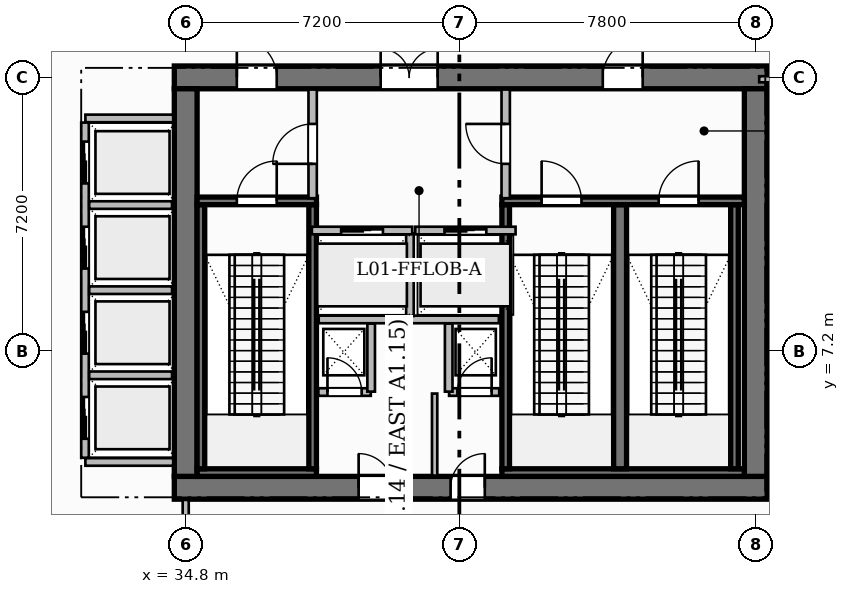
"""IFC4 building model, lengths in metres.
Left out: names, types, materials, properties, quantities, classifications, styles, units other than length and angle.
Written with IfcOpenShell. Run it as: python <this file> out.ifc"""

import sys

from ifc_helpers import new_model, si_unit, direction, frame, frame_2d, origin, place, context, subcontext, project, spatial, rectangle, extrude, source, transform, mapped, element, fill, save


model = new_model("IFC4")
c1 = context("Model", 3, precision=1e-05, world=origin(), true_north=direction((0.0, 1.0)))
c2 = subcontext(c1, "Body", "Model", "MODEL_VIEW")
j1 = project(units=[si_unit("LENGTHUNIT", "METRE"), si_unit("PLANEANGLEUNIT", "RADIAN")], contexts=[c1])
p1 = place(None, origin())
s1 = spatial("IfcSite", under=j1, at=p1, CompositionType="ELEMENT")
p2 = place(p1, origin())
s2 = spatial("IfcBuilding", under=s1, at=p2, CompositionType="ELEMENT")
p3 = place(p2, frame((0.0, 0.0, 5.4)))
s3 = spatial("IfcBuildingStorey", under=s2, at=p3, CompositionType="ELEMENT", Elevation=5.4)
p4 = place(p3, frame((34.5, 3.6, 0.0), z_axis=(0.0, 0.0, 1.0), x_axis=(1.0, 0.0, 0.0)))
e1 = element("IfcWall", 1, at=p4, inside=s3, PredefinedType="SHEAR", context=c2, shape_type="SweptSolid", body=[
    extrude(rectangle(XDim=15.6, YDim=0.6, at=frame_2d((7.8, 0.0))), origin(), (0.0, 0.0, 1.0), 5.4),
])
p5 = place(p4, frame((4.85, 0.0, 0.0)))
e2 = element("IfcOpeningElement", 2, at=p5, cuts=e1, PredefinedType="OPENING", context=c2, shape_type="SweptSolid", body=[
    extrude(rectangle(XDim=0.9, YDim=2.1, at=frame_2d((0.45, 1.05))), frame((0.0, 0.31, 0.0), z_axis=(0.0, -1.0, 0.0), x_axis=(1.0, 0.0, 0.0)), (0.0, 0.0, 1.0), 0.62),
])
p6 = place(p4, frame((7.27, 0.0, 0.0)))
e3 = element("IfcOpeningElement", 3, at=p6, cuts=e1, PredefinedType="OPENING", context=c2, shape_type="SweptSolid", body=[
    extrude(rectangle(XDim=0.9, YDim=2.1, at=frame_2d((0.45, 1.05))), frame((0.0, 0.31, 0.0), z_axis=(0.0, -1.0, 0.0), x_axis=(1.0, 0.0, 0.0)), (0.0, 0.0, 1.0), 0.62),
])
p7 = place(p3, frame((34.5, 14.4, 0.0), z_axis=(0.0, 0.0, 1.0), x_axis=(1.0, 0.0, 0.0)))
e4 = element("IfcWall", 4, at=p7, inside=s3, PredefinedType="SHEAR", context=c2, shape_type="SweptSolid", body=[
    extrude(rectangle(XDim=15.6, YDim=0.6, at=frame_2d((7.8, 0.0))), origin(), (0.0, 0.0, 1.0), 5.4),
])
p8 = place(p7, frame((5.43, 0.0, 0.0)))
e5 = element("IfcOpeningElement", 5, at=p8, cuts=e4, PredefinedType="OPENING", context=c2, shape_type="SweptSolid", body=[
    extrude(rectangle(XDim=1.5, YDim=2.2, at=frame_2d((0.75, 1.1))), frame((0.0, 0.31, 0.0), z_axis=(0.0, -1.0, 0.0), x_axis=(1.0, 0.0, 0.0)), (0.0, 0.0, 1.0), 0.62),
])
p9 = place(p7, frame((1.645, 0.0, 0.0)))
e6 = element("IfcOpeningElement", 6, at=p9, cuts=e4, PredefinedType="OPENING", context=c2, shape_type="SweptSolid", body=[
    extrude(rectangle(XDim=1.05, YDim=2.15, at=frame_2d((0.525, 1.075))), frame((0.0, 0.31, 0.0), z_axis=(0.0, -1.0, 0.0), x_axis=(1.0, 0.0, 0.0)), (0.0, 0.0, 1.0), 0.62),
])
p10 = place(p7, frame((11.275, 0.0, 0.0)))
e7 = element("IfcOpeningElement", 7, at=p10, cuts=e4, PredefinedType="OPENING", context=c2, shape_type="SweptSolid", body=[
    extrude(rectangle(XDim=1.05, YDim=2.15, at=frame_2d((0.525, 1.075))), frame((0.0, 0.31, 0.0), z_axis=(0.0, -1.0, 0.0), x_axis=(1.0, 0.0, 0.0)), (0.0, 0.0, 1.0), 0.62),
])
for number, where, z_axis, x_axis in (
    (8, (34.8, 3.9, 0.0), (0.0, 0.0, 1.0), (0.0, 1.0, 0.0)),
    (9, (49.8, 3.9, 0.0), (0.0, 0.0, 1.0), (0.0, 1.0, 0.0)),
):
    element("IfcWall", number, at=place(p3, frame(where, z_axis=z_axis, x_axis=x_axis)), inside=s3, PredefinedType="SHEAR", context=c2, shape_type="SweptSolid", body=[
        extrude(rectangle(XDim=10.2, YDim=0.6, at=frame_2d((5.1, 0.0))), origin(), (0.0, 0.0, 1.0), 5.4),
    ])
p11 = place(p3, frame((35.1, 4.0, 0.0), z_axis=(0.0, 0.0, 1.0), x_axis=(1.0, 0.0, 0.0)))
e10 = element("IfcWall", 10, at=p11, inside=s3, PredefinedType="SHEAR", context=c2, shape_type="SweptSolid", body=[
    extrude(rectangle(XDim=3.14, YDim=0.2, at=frame_2d((1.57, 0.0))), origin(), (0.0, 0.0, 1.0), 5.4),
])
for number, where, z_axis, x_axis in (
    (11, (35.2, 4.1, 0.0), (0.0, 0.0, 1.0), (0.0, 1.0, 0.0)),
    (12, (38.14, 4.1, 0.0), (0.0, 0.0, 1.0), (0.0, 1.0, 0.0)),
):
    element("IfcWall", number, at=place(p3, frame(where, z_axis=z_axis, x_axis=x_axis)), inside=s3, PredefinedType="SHEAR", context=c2, shape_type="SweptSolid", body=[
        extrude(rectangle(XDim=6.95, YDim=0.2, at=frame_2d((3.475, 0.0))), origin(), (0.0, 0.0, 1.0), 5.4),
    ])
p12 = place(p3, frame((35.1, 11.15, 0.0), z_axis=(0.0, 0.0, 1.0), x_axis=(1.0, 0.0, 0.0)))
e13 = element("IfcWall", 13, at=p12, inside=s3, PredefinedType="SHEAR", context=c2, shape_type="SweptSolid", body=[
    extrude(rectangle(XDim=3.14, YDim=0.2, at=frame_2d((1.57, 0.0))), origin(), (0.0, 0.0, 1.0), 5.4),
])
p13 = place(p12, frame((1.045, 0.0, 0.0)))
e14 = element("IfcOpeningElement", 14, at=p13, cuts=e13, PredefinedType="OPENING", context=c2, shape_type="SweptSolid", body=[
    extrude(rectangle(XDim=1.05, YDim=2.2, at=frame_2d((0.525, 1.1))), frame((0.0, 0.11, 0.0), z_axis=(0.0, -1.0, 0.0), x_axis=(1.0, 0.0, 0.0)), (0.0, 0.0, 1.0), 0.22),
])
p14 = place(p3, frame((43.12, 4.0, 0.0), z_axis=(0.0, 0.0, 1.0), x_axis=(1.0, 0.0, 0.0)))
e15 = element("IfcWall", 15, at=p14, inside=s3, PredefinedType="SHEAR", context=c2, shape_type="SweptSolid", body=[
    extrude(rectangle(XDim=6.38, YDim=0.2, at=frame_2d((3.19, 0.0))), origin(), (0.0, 0.0, 1.0), 5.4),
])
p15 = place(p3, frame((43.22, 4.1, 0.0), z_axis=(0.0, 0.0, 1.0), x_axis=(0.0, 1.0, 0.0)))
e16 = element("IfcWall", 16, at=p15, inside=s3, PredefinedType="SHEAR", context=c2, shape_type="SweptSolid", body=[
    extrude(rectangle(XDim=6.95, YDim=0.2, at=frame_2d((3.475, 0.0))), origin(), (0.0, 0.0, 1.0), 5.4),
])
p16 = place(p3, frame((46.23, 4.1, 0.0), z_axis=(0.0, 0.0, 1.0), x_axis=(0.0, 1.0, 0.0)))
e17 = element("IfcWall", 17, at=p16, inside=s3, PredefinedType="SHEAR", context=c2, shape_type="SweptSolid", body=[
    extrude(rectangle(XDim=6.95, YDim=0.34, at=frame_2d((3.475, 0.0))), origin(), (0.0, 0.0, 1.0), 5.4),
])
p17 = place(p3, frame((49.24, 4.1, 0.0), z_axis=(0.0, 0.0, 1.0), x_axis=(0.0, 1.0, 0.0)))
e18 = element("IfcWall", 18, at=p17, inside=s3, PredefinedType="SHEAR", context=c2, shape_type="SweptSolid", body=[
    extrude(rectangle(XDim=6.95, YDim=0.2, at=frame_2d((3.475, 0.0))), origin(), (0.0, 0.0, 1.0), 5.4),
])
p18 = place(p3, frame((43.12, 11.15, 0.0), z_axis=(0.0, 0.0, 1.0), x_axis=(1.0, 0.0, 0.0)))
e19 = element("IfcWall", 19, at=p18, inside=s3, PredefinedType="SHEAR", context=c2, shape_type="SweptSolid", body=[
    extrude(rectangle(XDim=6.38, YDim=0.2, at=frame_2d((3.19, 0.0))), origin(), (0.0, 0.0, 1.0), 5.4),
])
p19 = place(p18, frame((1.045, 0.0, 0.0)))
e20 = element("IfcOpeningElement", 20, at=p19, cuts=e19, PredefinedType="OPENING", context=c2, shape_type="SweptSolid", body=[
    extrude(rectangle(XDim=1.05, YDim=2.2, at=frame_2d((0.525, 1.1))), frame((0.0, 0.11, 0.0), z_axis=(0.0, -1.0, 0.0), x_axis=(1.0, 0.0, 0.0)), (0.0, 0.0, 1.0), 0.22),
])
p20 = place(p18, frame((4.125, 0.0, 0.0)))
e21 = element("IfcOpeningElement", 21, at=p20, cuts=e19, PredefinedType="OPENING", context=c2, shape_type="SweptSolid", body=[
    extrude(rectangle(XDim=1.05, YDim=2.2, at=frame_2d((0.525, 1.1))), frame((0.0, 0.11, 0.0), z_axis=(0.0, -1.0, 0.0), x_axis=(1.0, 0.0, 0.0)), (0.0, 0.0, 1.0), 0.22),
])
p21 = place(p3, frame((38.3, 8.03, 0.0), z_axis=(0.0, 0.0, 1.0), x_axis=(1.0, 0.0, 0.0)))
e22 = element("IfcWall", 22, at=p21, inside=s3, PredefinedType="PARTITIONING", context=c2, shape_type="SweptSolid", body=[
    extrude(rectangle(XDim=4.74, YDim=0.2, at=frame_2d((2.37, 0.0))), origin(), (0.0, 0.0, 1.0), 5.1),
])
p22 = place(p3, frame((40.7, 8.12, 0.0), z_axis=(0.0, 0.0, 1.0), x_axis=(0.0, 1.0, 0.0)))
e23 = element("IfcWall", 23, at=p22, inside=s3, PredefinedType="PARTITIONING", context=c2, shape_type="SweptSolid", body=[
    extrude(rectangle(XDim=2.18, YDim=0.2, at=frame_2d((1.09, 0.0))), origin(), (0.0, 0.0, 1.0), 5.1),
])
p23 = place(p3, frame((38.14, 11.22, 0.0), z_axis=(0.0, 0.0, 1.0), x_axis=(0.0, 1.0, 0.0)))
e24 = element("IfcWall", 24, at=p23, inside=s3, PredefinedType="PARTITIONING", context=c2, shape_type="SweptSolid", body=[
    extrude(rectangle(XDim=2.86, YDim=0.22, at=frame_2d((1.43, 0.0))), origin(), (0.0, 0.0, 1.0), 5.1),
])
p24 = place(p23, frame((0.905, 0.0, 0.0)))
e25 = element("IfcOpeningElement", 25, at=p24, cuts=e24, PredefinedType="OPENING", context=c2, shape_type="SweptSolid", body=[
    extrude(rectangle(XDim=1.05, YDim=2.15, at=frame_2d((0.525, 1.075))), frame((0.0, 0.12, 0.0), z_axis=(0.0, -1.0, 0.0), x_axis=(1.0, 0.0, 0.0)), (0.0, 0.0, 1.0), 0.24),
])
p25 = place(p3, frame((43.22, 11.22, 0.0), z_axis=(0.0, 0.0, 1.0), x_axis=(0.0, 1.0, 0.0)))
e26 = element("IfcWall", 26, at=p25, inside=s3, PredefinedType="PARTITIONING", context=c2, shape_type="SweptSolid", body=[
    extrude(rectangle(XDim=2.86, YDim=0.22, at=frame_2d((1.43, 0.0))), origin(), (0.0, 0.0, 1.0), 5.1),
])
p26 = place(p25, frame((0.905, 0.0, 0.0)))
e27 = element("IfcOpeningElement", 27, at=p26, cuts=e26, PredefinedType="OPENING", context=c2, shape_type="SweptSolid", body=[
    extrude(rectangle(XDim=1.05, YDim=2.15, at=frame_2d((0.525, 1.075))), frame((0.0, 0.12, 0.0), z_axis=(0.0, -1.0, 0.0), x_axis=(1.0, 0.0, 0.0)), (0.0, 0.0, 1.0), 0.24),
])
p27 = place(p3, frame((38.29, 6.12, 0.0), z_axis=(0.0, 0.0, 1.0), x_axis=(1.0, 0.0, 0.0)))
e28 = element("IfcWall", 28, at=p27, inside=s3, PredefinedType="PARTITIONING", context=c2, shape_type="SweptSolid", body=[
    extrude(rectangle(XDim=1.38, YDim=0.2, at=frame_2d((0.69, 0.0))), origin(), (0.0, 0.0, 1.0), 5.1),
])
p28 = place(p27, frame((0.24, 0.0, 0.0)))
e29 = element("IfcOpeningElement", 29, at=p28, cuts=e28, PredefinedType="OPENING", context=c2, shape_type="SweptSolid", body=[
    extrude(rectangle(XDim=0.9, YDim=2.1, at=frame_2d((0.45, 1.05))), frame((0.0, 0.11, 0.0), z_axis=(0.0, -1.0, 0.0), x_axis=(1.0, 0.0, 0.0)), (0.0, 0.0, 1.0), 0.22),
])
p29 = place(p3, frame((39.68, 6.13, 0.0), z_axis=(0.0, 0.0, 1.0), x_axis=(0.0, 1.0, 0.0)))
e30 = element("IfcWall", 30, at=p29, inside=s3, PredefinedType="PARTITIONING", context=c2, shape_type="SweptSolid", body=[
    extrude(rectangle(XDim=1.79, YDim=0.2, at=frame_2d((0.895, 0.0))), origin(), (0.0, 0.0, 1.0), 5.1),
])
p30 = place(p3, frame((41.73, 6.12, 0.0), z_axis=(0.0, 0.0, 1.0), x_axis=(1.0, 0.0, 0.0)))
e31 = element("IfcWall", 31, at=p30, inside=s3, PredefinedType="PARTITIONING", context=c2, shape_type="SweptSolid", body=[
    extrude(rectangle(XDim=1.32, YDim=0.2, at=frame_2d((0.66, 0.0))), origin(), (0.0, 0.0, 1.0), 5.1),
])
p31 = place(p30, frame((0.22, 0.0, 0.0)))
e32 = element("IfcOpeningElement", 32, at=p31, cuts=e31, PredefinedType="OPENING", context=c2, shape_type="SweptSolid", body=[
    extrude(rectangle(XDim=0.9, YDim=2.1, at=frame_2d((0.45, 1.05))), frame((0.0, 0.11, 0.0), z_axis=(0.0, -1.0, 0.0), x_axis=(1.0, 0.0, 0.0)), (0.0, 0.0, 1.0), 0.22),
])
p32 = place(p3, frame((41.72, 6.13, 0.0), z_axis=(0.0, 0.0, 1.0), x_axis=(0.0, 1.0, 0.0)))
e33 = element("IfcWall", 33, at=p32, inside=s3, PredefinedType="PARTITIONING", context=c2, shape_type="SweptSolid", body=[
    extrude(rectangle(XDim=1.79, YDim=0.2, at=frame_2d((0.895, 0.0))), origin(), (0.0, 0.0, 1.0), 5.1),
])
p33 = place(p3, frame((41.35, 3.92, 0.0), z_axis=(0.0, 0.0, 1.0), x_axis=(0.0, 1.0, 0.0)))
e34 = element("IfcWall", 34, at=p33, inside=s3, PredefinedType="PARTITIONING", context=c2, shape_type="SweptSolid", body=[
    extrude(rectangle(XDim=2.16, YDim=0.14, at=frame_2d((1.08, 0.0))), origin(), (0.0, 0.0, 1.0), 5.1),
])
for number, where, z_axis, x_axis in (
    (35, (32.16, 4.28, 0.0), (0.0, 0.0, 1.0), (1.0, 0.0, 0.0)),
    (36, (32.16, 13.32, 0.0), (0.0, 0.0, 1.0), (1.0, 0.0, 0.0)),
):
    element("IfcWall", number, at=place(p3, frame(where, z_axis=z_axis, x_axis=x_axis)), inside=s3, PredefinedType="PARTITIONING", context=c2, shape_type="SweptSolid", body=[
        extrude(rectangle(XDim=2.31, YDim=0.2, at=frame_2d((1.155, 0.0))), origin(), (0.0, 0.0, 1.0), 5.1),
    ])
p34 = place(p3, frame((32.15, 4.39, 0.0), z_axis=(0.0, 0.0, 1.0), x_axis=(0.0, 1.0, 0.0)))
e37 = element("IfcWall", 37, at=p34, inside=s3, PredefinedType="PARTITIONING", context=c2, shape_type="SweptSolid", body=[
    extrude(rectangle(XDim=8.82, YDim=0.2, at=frame_2d((4.41, 0.0))), origin(), (0.0, 0.0, 1.0), 5.1),
])
p35 = place(p34, frame((0.5, 0.0, 0.0)))
e38 = element("IfcOpeningElement", 38, at=p35, cuts=e37, PredefinedType="OPENING", context=c2, shape_type="SweptSolid", body=[
    extrude(rectangle(XDim=1.1, YDim=2.2, at=frame_2d((0.55, 1.1))), frame((0.0, 0.11, 0.0), z_axis=(0.0, -1.0, 0.0), x_axis=(1.0, 0.0, 0.0)), (0.0, 0.0, 1.0), 0.22),
])
p36 = place(p34, frame((2.74, 0.0, 0.0)))
e39 = element("IfcOpeningElement", 39, at=p36, cuts=e37, PredefinedType="OPENING", context=c2, shape_type="SweptSolid", body=[
    extrude(rectangle(XDim=1.1, YDim=2.2, at=frame_2d((0.55, 1.1))), frame((0.0, 0.11, 0.0), z_axis=(0.0, -1.0, 0.0), x_axis=(1.0, 0.0, 0.0)), (0.0, 0.0, 1.0), 0.22),
])
p37 = place(p34, frame((4.98, 0.0, 0.0)))
e40 = element("IfcOpeningElement", 40, at=p37, cuts=e37, PredefinedType="OPENING", context=c2, shape_type="SweptSolid", body=[
    extrude(rectangle(XDim=1.1, YDim=2.2, at=frame_2d((0.55, 1.1))), frame((0.0, 0.11, 0.0), z_axis=(0.0, -1.0, 0.0), x_axis=(1.0, 0.0, 0.0)), (0.0, 0.0, 1.0), 0.22),
])
p38 = place(p34, frame((7.22, 0.0, 0.0)))
e41 = element("IfcOpeningElement", 41, at=p38, cuts=e37, PredefinedType="OPENING", context=c2, shape_type="SweptSolid", body=[
    extrude(rectangle(XDim=1.1, YDim=2.2, at=frame_2d((0.55, 1.1))), frame((0.0, 0.11, 0.0), z_axis=(0.0, -1.0, 0.0), x_axis=(1.0, 0.0, 0.0)), (0.0, 0.0, 1.0), 0.22),
])
for number, where, z_axis, x_axis in (
    (42, (32.26, 6.56, 0.0), (0.0, 0.0, 1.0), (1.0, 0.0, 0.0)),
    (43, (32.26, 8.8, 0.0), (0.0, 0.0, 1.0), (1.0, 0.0, 0.0)),
    (44, (32.26, 11.04, 0.0), (0.0, 0.0, 1.0), (1.0, 0.0, 0.0)),
):
    element("IfcWall", number, at=place(p3, frame(where, z_axis=z_axis, x_axis=x_axis)), inside=s3, PredefinedType="PARTITIONING", context=c2, shape_type="SweptSolid", body=[
        extrude(rectangle(XDim=2.18, YDim=0.2, at=frame_2d((1.09, 0.0))), origin(), (0.0, 0.0, 1.0), 5.1),
    ])
p39 = place(p3, frame((34.8, 0.32, 0.0), z_axis=(0.0, 0.0, 1.0), x_axis=(0.0, 1.0, 0.0)))
e45 = element("IfcWall", 45, at=p39, inside=s3, PredefinedType="PARTITIONING", context=c2, shape_type="SweptSolid", body=[
    extrude(rectangle(XDim=2.96, YDim=0.16, at=frame_2d((1.48, 0.0))), origin(), (0.0, 0.0, 1.0), 5.1),
])
p40 = place(p39, frame((0.955, 0.0, 0.0)))
e46 = element("IfcOpeningElement", 46, at=p40, cuts=e45, PredefinedType="OPENING", context=c2, shape_type="SweptSolid", body=[
    extrude(rectangle(XDim=1.05, YDim=2.15, at=frame_2d((0.525, 1.075))), frame((0.0, 0.09, 0.0), z_axis=(0.0, -1.0, 0.0), x_axis=(1.0, 0.0, 0.0)), (0.0, 0.0, 1.0), 0.18),
])
p41 = place(p3, frame((49.89, 14.35, 0.0), z_axis=(0.0, 0.0, 1.0), x_axis=(1.0, 0.0, 0.0)))
e47 = element("IfcWall", 47, at=p41, inside=s3, PredefinedType="PARTITIONING", context=c2, shape_type="SweptSolid", body=[
    extrude(rectangle(XDim=30.342, YDim=0.16, at=frame_2d((15.171, 0.0))), origin(), (0.0, 0.0, 1.0), 4.185),
])
p42 = place(p41, frame((13.31, 0.0, 0.0)))
e48 = element("IfcOpeningElement", 48, at=p42, cuts=e47, PredefinedType="OPENING", context=c2, shape_type="SweptSolid", body=[
    extrude(rectangle(XDim=1.6, YDim=2.4, at=frame_2d((0.8, 1.2))), frame((0.0, 0.09, 0.0), z_axis=(0.0, -1.0, 0.0), x_axis=(1.0, 0.0, 0.0)), (0.0, 0.0, 1.0), 0.18),
])
p43 = place(p3, frame((38.12, 10.37, 0.0), z_axis=(0.0, 0.0, 1.0), x_axis=(1.0, 0.0, 0.0)))
e49 = element("IfcWall", 49, at=p43, inside=s3, PredefinedType="PARTITIONING", context=c2, shape_type="SweptSolid", body=[
    extrude(rectangle(XDim=2.64, YDim=0.2, at=frame_2d((1.32, 0.0))), origin(), (0.0, 0.0, 1.0), 5.1),
])
p44 = place(p43, frame((0.77, 0.0, 0.0)))
e50 = element("IfcOpeningElement", 50, at=p44, cuts=e49, PredefinedType="OPENING", context=c2, shape_type="SweptSolid", body=[
    extrude(rectangle(XDim=1.1, YDim=2.2, at=frame_2d((0.55, 1.1))), frame((0.0, 0.11, 0.0), z_axis=(0.0, -1.0, 0.0), x_axis=(1.0, 0.0, 0.0)), (0.0, 0.0, 1.0), 0.22),
])
p45 = place(p3, frame((40.84, 10.37, 0.0), z_axis=(0.0, 0.0, 1.0), x_axis=(1.0, 0.0, 0.0)))
e51 = element("IfcWall", 51, at=p45, inside=s3, PredefinedType="PARTITIONING", context=c2, shape_type="SweptSolid", body=[
    extrude(rectangle(XDim=2.64, YDim=0.2, at=frame_2d((1.32, 0.0))), origin(), (0.0, 0.0, 1.0), 5.1),
])
p46 = place(p45, frame((0.77, 0.0, 0.0)))
e52 = element("IfcOpeningElement", 52, at=p46, cuts=e51, PredefinedType="OPENING", context=c2, shape_type="SweptSolid", body=[
    extrude(rectangle(XDim=1.1, YDim=2.2, at=frame_2d((0.55, 1.1))), frame((0.0, 0.11, 0.0), z_axis=(0.0, -1.0, 0.0), x_axis=(1.0, 0.0, 0.0)), (0.0, 0.0, 1.0), 0.22),
])
m1 = source(origin(), c2, "Body", "SweptSolid", [
    extrude(rectangle(XDim=1.05, YDim=2.2, at=frame_2d((0.525, 1.1))), frame((0.0, 0.025, 0.0), z_axis=(0.0, -1.0, 0.0), x_axis=(1.0, 0.0, 0.0)), (0.0, 0.0, 1.0), 0.05),
])
p47 = place(p13, origin())
e53 = element("IfcDoor", 53, at=p47, inside=s3, OperationType="SINGLE_SWING_RIGHT", PredefinedType="DOOR", context=c2, shape_type="MappedRepresentation", body=[
    mapped(m1, transform((0.0, 0.0, 0.0), scale=1.0)),
])
fill(e14, e53)
p48 = place(p19, origin())
e54 = element("IfcDoor", 54, at=p48, inside=s3, OperationType="SINGLE_SWING_LEFT", PredefinedType="DOOR", context=c2, shape_type="MappedRepresentation", body=[
    mapped(m1, transform((0.0, 0.0, 0.0), scale=1.0)),
])
fill(e20, e54)
p49 = place(p20, origin())
e55 = element("IfcDoor", 55, at=p49, inside=s3, OperationType="SINGLE_SWING_RIGHT", PredefinedType="DOOR", context=c2, shape_type="MappedRepresentation", body=[
    mapped(m1, transform((0.0, 0.0, 0.0), scale=1.0)),
])
fill(e21, e55)
m2 = source(origin(), c2, "Body", "SweptSolid", [
    extrude(rectangle(XDim=1.05, YDim=2.15, at=frame_2d((0.525, 1.075))), frame((0.0, 0.025, 0.0), z_axis=(0.0, -1.0, 0.0), x_axis=(1.0, 0.0, 0.0)), (0.0, 0.0, 1.0), 0.05),
])
p50 = place(p24, origin())
e56 = element("IfcDoor", 56, at=p50, inside=s3, OperationType="SINGLE_SWING_LEFT", PredefinedType="DOOR", context=c2, shape_type="MappedRepresentation", body=[
    mapped(m2, transform((0.0, 0.0, 0.0), scale=1.0)),
])
fill(e25, e56)
p51 = place(p26, origin())
e57 = element("IfcDoor", 57, at=p51, inside=s3, OperationType="SINGLE_SWING_RIGHT", PredefinedType="DOOR", context=c2, shape_type="MappedRepresentation", body=[
    mapped(m2, transform((0.0, 0.0, 0.0), scale=1.0)),
])
fill(e27, e57)
m3 = source(origin(), c2, "Body", "SweptSolid", [
    extrude(rectangle(XDim=1.5, YDim=2.2, at=frame_2d((0.75, 1.1))), frame((0.0, 0.025, 0.0), z_axis=(0.0, -1.0, 0.0), x_axis=(1.0, 0.0, 0.0)), (0.0, 0.0, 1.0), 0.05),
])
p52 = place(p8, origin())
e58 = element("IfcDoor", 58, at=p52, inside=s3, OperationType="DOUBLE_DOOR_SINGLE_SWING", PredefinedType="DOOR", context=c2, shape_type="MappedRepresentation", body=[
    mapped(m3, transform((0.0, 0.0, 0.0), scale=1.0)),
])
fill(e5, e58)
p53 = place(p9, origin())
e59 = element("IfcDoor", 59, at=p53, inside=s3, OperationType="SINGLE_SWING_LEFT", PredefinedType="DOOR", context=c2, shape_type="MappedRepresentation", body=[
    mapped(m2, transform((0.0, 0.0, 0.0), scale=1.0)),
])
fill(e6, e59)
p54 = place(p10, origin())
e60 = element("IfcDoor", 60, at=p54, inside=s3, OperationType="SINGLE_SWING_RIGHT", PredefinedType="DOOR", context=c2, shape_type="MappedRepresentation", body=[
    mapped(m2, transform((0.0, 0.0, 0.0), scale=1.0)),
])
fill(e7, e60)
m4 = source(origin(), c2, "Body", "SweptSolid", [
    extrude(rectangle(XDim=0.9, YDim=2.1, at=frame_2d((0.45, 1.05))), frame((0.0, 0.025, 0.0), z_axis=(0.0, -1.0, 0.0), x_axis=(1.0, 0.0, 0.0)), (0.0, 0.0, 1.0), 0.05),
])
p55 = place(p28, origin())
e61 = element("IfcDoor", 61, at=p55, inside=s3, OperationType="SINGLE_SWING_LEFT", PredefinedType="DOOR", context=c2, shape_type="MappedRepresentation", body=[
    mapped(m4, transform((0.0, 0.0, 0.0), scale=1.0)),
])
fill(e29, e61)
p56 = place(p31, origin())
e62 = element("IfcDoor", 62, at=p56, inside=s3, OperationType="SINGLE_SWING_RIGHT", PredefinedType="DOOR", context=c2, shape_type="MappedRepresentation", body=[
    mapped(m4, transform((0.0, 0.0, 0.0), scale=1.0)),
])
fill(e32, e62)
p57 = place(p5, origin())
e63 = element("IfcDoor", 63, at=p57, inside=s3, OperationType="SINGLE_SWING_LEFT", PredefinedType="DOOR", context=c2, shape_type="MappedRepresentation", body=[
    mapped(m4, transform((0.0, 0.0, 0.0), scale=1.0)),
])
fill(e2, e63)
p58 = place(p6, origin())
e64 = element("IfcDoor", 64, at=p58, inside=s3, OperationType="SINGLE_SWING_RIGHT", PredefinedType="DOOR", context=c2, shape_type="MappedRepresentation", body=[
    mapped(m4, transform((0.0, 0.0, 0.0), scale=1.0)),
])
fill(e3, e64)
m5 = source(origin(), c2, "Body", "SweptSolid", [
    extrude(rectangle(XDim=1.1, YDim=2.2, at=frame_2d((0.55, 1.1))), frame((0.0, 0.025, 0.0), z_axis=(0.0, -1.0, 0.0), x_axis=(1.0, 0.0, 0.0)), (0.0, 0.0, 1.0), 0.05),
])
p59 = place(p44, origin())
e65 = element("IfcDoor", 65, at=p59, inside=s3, OperationType="SLIDING_TO_LEFT", PredefinedType="DOOR", context=c2, shape_type="MappedRepresentation", body=[
    mapped(m5, transform((0.0, 0.0, 0.0), scale=1.0)),
])
fill(e50, e65)
p60 = place(p46, origin())
e66 = element("IfcDoor", 66, at=p60, inside=s3, OperationType="SLIDING_TO_LEFT", PredefinedType="DOOR", context=c2, shape_type="MappedRepresentation", body=[
    mapped(m5, transform((0.0, 0.0, 0.0), scale=1.0)),
])
fill(e52, e66)
p61 = place(p35, origin())
e67 = element("IfcDoor", 67, at=p61, inside=s3, OperationType="SLIDING_TO_LEFT", PredefinedType="DOOR", context=c2, shape_type="MappedRepresentation", body=[
    mapped(m5, transform((0.0, 0.0, 0.0), scale=1.0)),
])
fill(e38, e67)
p62 = place(p36, origin())
e68 = element("IfcDoor", 68, at=p62, inside=s3, OperationType="SLIDING_TO_LEFT", PredefinedType="DOOR", context=c2, shape_type="MappedRepresentation", body=[
    mapped(m5, transform((0.0, 0.0, 0.0), scale=1.0)),
])
fill(e39, e68)
p63 = place(p37, origin())
e69 = element("IfcDoor", 69, at=p63, inside=s3, OperationType="SLIDING_TO_LEFT", PredefinedType="DOOR", context=c2, shape_type="MappedRepresentation", body=[
    mapped(m5, transform((0.0, 0.0, 0.0), scale=1.0)),
])
fill(e40, e69)
p64 = place(p38, origin())
e70 = element("IfcDoor", 70, at=p64, inside=s3, OperationType="SLIDING_TO_LEFT", PredefinedType="DOOR", context=c2, shape_type="MappedRepresentation", body=[
    mapped(m5, transform((0.0, 0.0, 0.0), scale=1.0)),
])
fill(e41, e70)
save(model, sys.argv[1])
